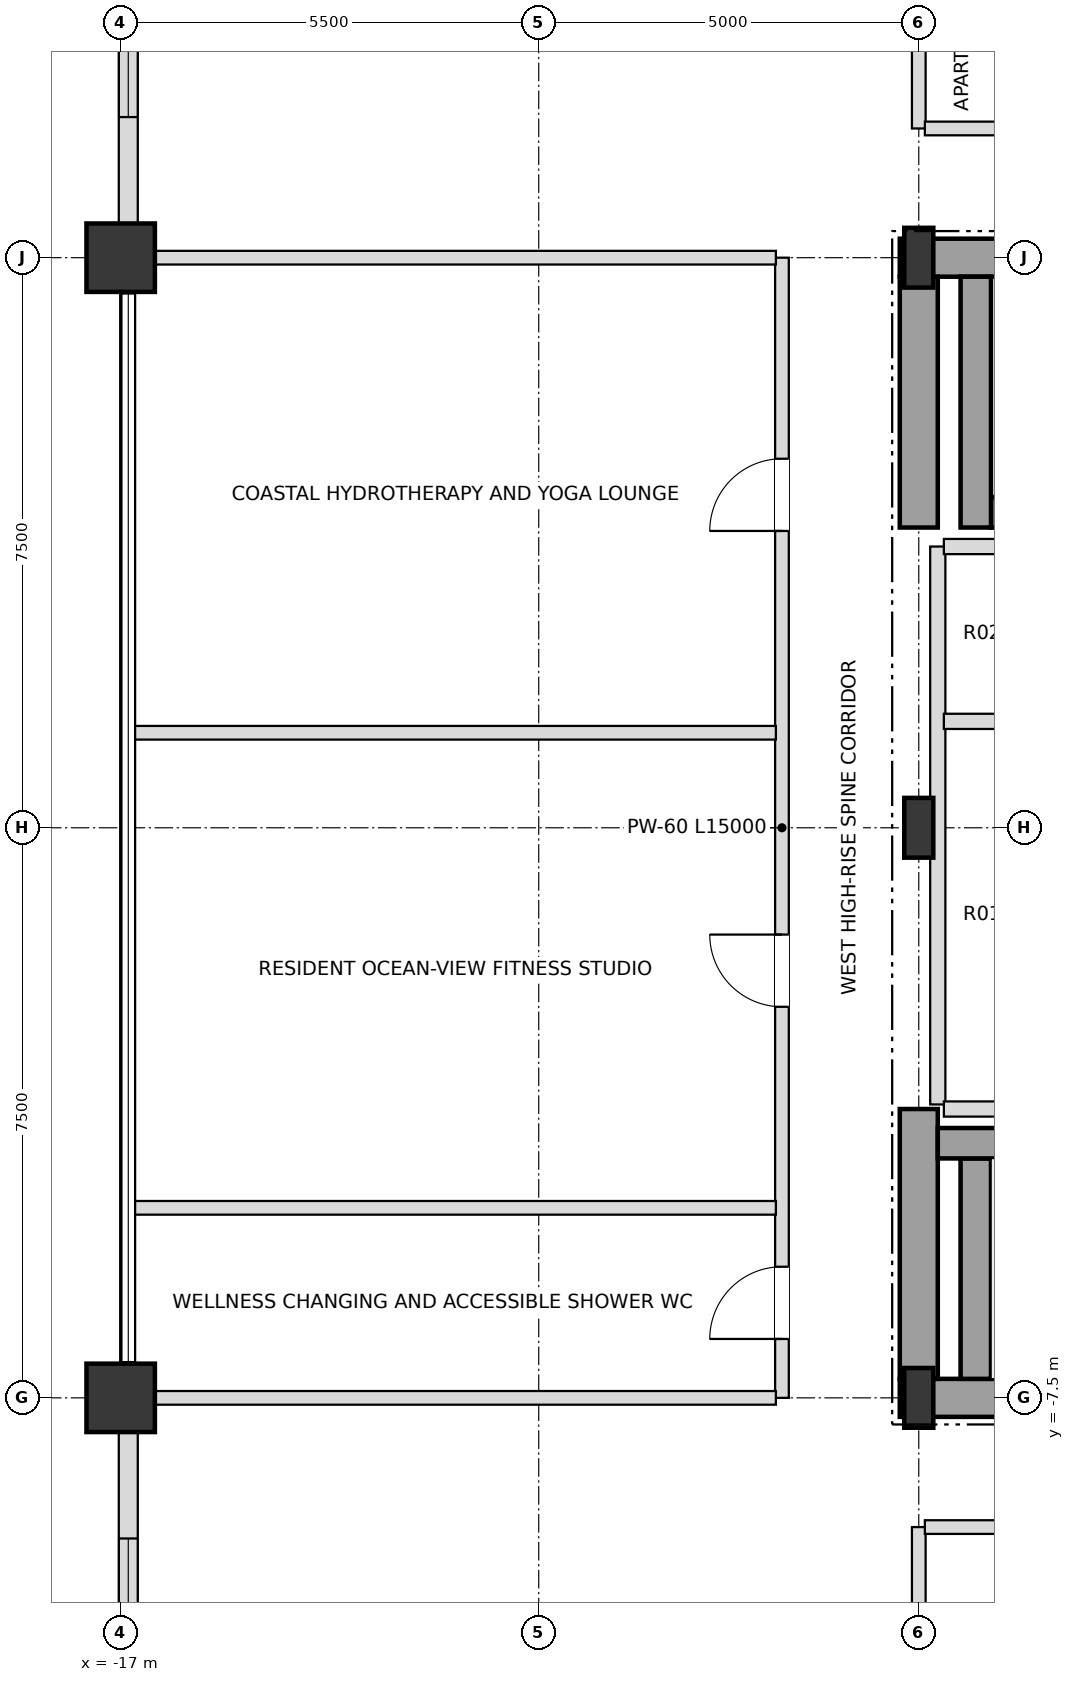
"""IFC4 building model, lengths in metres.
Left out: names, types, materials, properties, quantities, classifications, styles, units other than length and angle.
Written with IfcOpenShell. Run it as: python <this file> out.ifc"""

import sys

from ifc_helpers import new_model, si_unit, direction, frame, frame_2d, origin, origin_2d, place, context, subcontext, project, spatial, rectangle, i_section, extrude, element, fill, save


model = new_model("IFC4")
c1 = context("Model", 3, precision=1e-05, world=origin(), true_north=direction((0.0, 1.0)))
c2 = subcontext(c1, "Body", "Model", "MODEL_VIEW")
j1 = project(units=[si_unit("LENGTHUNIT", "METRE"), si_unit("PLANEANGLEUNIT", "RADIAN")], contexts=[c1])
p1 = place(None, origin())
s1 = spatial("IfcSite", under=j1, at=p1, CompositionType="ELEMENT")
p2 = place(p1, origin())
s2 = spatial("IfcBuilding", under=s1, at=p2, CompositionType="ELEMENT")
p3 = place(p2, frame((0.0, 0.0, 279.9)))
s3 = spatial("IfcBuildingStorey", under=s2, at=p3, CompositionType="ELEMENT", Elevation=279.9)
for number, where, z_axis, x_axis in (
    (1, (-6.5, -7.5, 0.0), (0.0, 0.0, 1.0), (1.0, 0.0, 0.0)),
    (2, (-6.5, 0.0, 0.0), (0.0, 0.0, 1.0), (1.0, 0.0, 0.0)),
    (3, (-6.5, 7.5, 0.0), (0.0, 0.0, 1.0), (1.0, 0.0, 0.0)),
):
    element("IfcColumn", number, at=place(p3, frame(where, z_axis=z_axis, x_axis=x_axis)), inside=s3, PredefinedType="COLUMN", context=c2, shape_type="SweptSolid", body=[
        extrude(i_section(OverallWidth=0.382, OverallDepth=0.786, WebThickness=0.02, FlangeThickness=0.033, at=origin_2d()), origin(), (0.0, 0.0, 1.0), 3.6),
    ])
for number, where, z_axis, x_axis in (
    (4, (-17.0, 7.5, 0.0), (0.0, 0.0, 1.0), (1.0, 0.0, 0.0)),
    (5, (-17.0, -7.5, 0.0), (0.0, 0.0, 1.0), (1.0, 0.0, 0.0)),
):
    element("IfcColumn", number, at=place(p3, frame(where, z_axis=z_axis, x_axis=x_axis)), inside=s3, PredefinedType="USERDEFINED", context=c2, shape_type="SweptSolid", body=[
        extrude(rectangle(XDim=0.9, YDim=0.9, at=origin_2d()), origin(), (0.0, 0.0, 1.0), 3.6),
    ])
p4 = place(p3, frame((-16.9, 12.555, 0.0), z_axis=(0.0, 0.0, 1.0), x_axis=(0.0, -1.0, 0.0)))
e6 = element("IfcWall", 6, at=p4, inside=s3, PredefinedType="SOLIDWALL", context=c2, shape_type="SweptSolid", body=[
    extrude(rectangle(XDim=4.61, YDim=0.25, at=frame_2d((2.305, 0.0))), origin(), (0.0, 0.0, 1.0), 2.748),
])
p5 = place(p4, frame((1.405, 0.0, 0.72)))
e7 = element("IfcOpeningElement", 7, at=p5, cuts=e6, PredefinedType="OPENING", context=c2, shape_type="SweptSolid", body=[
    extrude(rectangle(XDim=1.8, YDim=1.68, at=frame_2d((0.9, 0.84))), frame((0.0, 0.135, 0.0), z_axis=(0.0, -1.0, 0.0), x_axis=(1.0, 0.0, 0.0)), (0.0, 0.0, 1.0), 0.27),
])
p6 = place(p3, frame((-16.9, -7.945, 0.0), z_axis=(0.0, 0.0, 1.0), x_axis=(0.0, -1.0, 0.0)))
e8 = element("IfcWall", 8, at=p6, inside=s3, PredefinedType="SOLIDWALL", context=c2, shape_type="SweptSolid", body=[
    extrude(rectangle(XDim=4.61, YDim=0.25, at=frame_2d((2.305, 0.0))), origin(), (0.0, 0.0, 1.0), 2.748),
])
p7 = place(p6, frame((1.405, 0.0, 0.72)))
e9 = element("IfcOpeningElement", 9, at=p7, cuts=e8, PredefinedType="OPENING", context=c2, shape_type="SweptSolid", body=[
    extrude(rectangle(XDim=1.8, YDim=1.68, at=frame_2d((0.9, 0.84))), frame((0.0, 0.135, 0.0), z_axis=(0.0, -1.0, 0.0), x_axis=(1.0, 0.0, 0.0)), (0.0, 0.0, 1.0), 0.27),
])
p8 = place(p3, frame((-6.75, -7.5, 0.0), z_axis=(0.0, 0.0, 1.0), x_axis=(1.0, 0.0, 0.0)))
e10 = element("IfcWall", 10, at=p8, inside=s3, PredefinedType="SHEAR", context=c2, shape_type="SweptSolid", body=[
    extrude(rectangle(XDim=6.75, YDim=0.5, at=frame_2d((3.375, 0.0))), origin(), (0.0, 0.0, 1.0), 3.38),
])
p9 = place(p3, frame((-6.75, 7.5, 0.0), z_axis=(0.0, 0.0, 1.0), x_axis=(1.0, 0.0, 0.0)))
e11 = element("IfcWall", 11, at=p9, inside=s3, PredefinedType="SHEAR", context=c2, shape_type="SweptSolid", body=[
    extrude(rectangle(XDim=6.75, YDim=0.5, at=frame_2d((3.375, 0.0))), origin(), (0.0, 0.0, 1.0), 3.38),
])
p10 = place(p9, frame((1.65, 0.0, 0.0)))
e12 = element("IfcOpeningElement", 12, at=p10, cuts=e11, PredefinedType="OPENING", context=c2, shape_type="SweptSolid", body=[
    extrude(rectangle(XDim=1.05, YDim=2.15, at=frame_2d((0.525, 1.075))), frame((0.0, 0.26, 0.0), z_axis=(0.0, -1.0, 0.0), x_axis=(1.0, 0.0, 0.0)), (0.0, 0.0, 1.0), 0.52),
])
p11 = place(p3, frame((-6.5, -7.25, 0.0), z_axis=(0.0, 0.0, 1.0), x_axis=(0.0, 1.0, 0.0)))
e13 = element("IfcWall", 13, at=p11, inside=s3, PredefinedType="SHEAR", context=c2, shape_type="SweptSolid", body=[
    extrude(rectangle(XDim=3.55, YDim=0.5, at=frame_2d((1.775, 0.0))), origin(), (0.0, 0.0, 1.0), 3.38),
])
p12 = place(p3, frame((-6.5, 3.95, 0.0), z_axis=(0.0, 0.0, 1.0), x_axis=(0.0, 1.0, 0.0)))
e14 = element("IfcWall", 14, at=p12, inside=s3, PredefinedType="SHEAR", context=c2, shape_type="SweptSolid", body=[
    extrude(rectangle(XDim=3.3, YDim=0.5, at=frame_2d((1.65, 0.0))), origin(), (0.0, 0.0, 1.0), 3.38),
])
p13 = place(p3, frame((-5.75, -7.25, 0.0), z_axis=(0.0, 0.0, 1.0), x_axis=(0.0, 1.0, 0.0)))
e15 = element("IfcWall", 15, at=p13, inside=s3, PredefinedType="SHEAR", context=c2, shape_type="SweptSolid", body=[
    extrude(rectangle(XDim=2.9, YDim=0.4, at=frame_2d((1.45, 0.0))), origin(), (0.0, 0.0, 1.0), 3.38),
])
p14 = place(p3, frame((-6.25, -4.15, 0.0), z_axis=(0.0, 0.0, 1.0), x_axis=(1.0, 0.0, 0.0)))
e16 = element("IfcWall", 16, at=p14, inside=s3, PredefinedType="SHEAR", context=c2, shape_type="SweptSolid", body=[
    extrude(rectangle(XDim=7.78, YDim=0.4, at=frame_2d((3.89, 0.0))), origin(), (0.0, 0.0, 1.0), 3.38),
])
p15 = place(p3, frame((-5.55, 4.15, 0.0), z_axis=(0.0, 0.0, 1.0), x_axis=(1.0, 0.0, 0.0)))
e17 = element("IfcWall", 17, at=p15, inside=s3, PredefinedType="SHEAR", context=c2, shape_type="SweptSolid", body=[
    extrude(rectangle(XDim=7.08, YDim=0.4, at=frame_2d((3.54, 0.0))), origin(), (0.0, 0.0, 1.0), 3.38),
])
p16 = place(p3, frame((-5.75, 3.95, 0.0), z_axis=(0.0, 0.0, 1.0), x_axis=(0.0, 1.0, 0.0)))
e18 = element("IfcWall", 18, at=p16, inside=s3, PredefinedType="SHEAR", context=c2, shape_type="SweptSolid", body=[
    extrude(rectangle(XDim=3.3, YDim=0.4, at=frame_2d((1.65, 0.0))), origin(), (0.0, 0.0, 1.0), 3.38),
])
p17 = place(p3, frame((-8.3, -7.5, 0.0), z_axis=(0.0, 0.0, 1.0), x_axis=(0.0, 1.0, 0.0)))
e19 = element("IfcWall", 19, at=p17, inside=s3, PredefinedType="PARTITIONING", context=c2, shape_type="SweptSolid", body=[
    extrude(rectangle(XDim=15.0, YDim=0.18, at=frame_2d((7.5, 0.0))), origin(), (0.0, 0.0, 1.0), 3.38),
])
p18 = place(p17, frame((0.775, 0.0, 0.0)))
e20 = element("IfcOpeningElement", 20, at=p18, cuts=e19, PredefinedType="OPENING", context=c2, shape_type="SweptSolid", body=[
    extrude(rectangle(XDim=0.95, YDim=2.15, at=frame_2d((0.475, 1.075))), frame((0.0, 0.1, 0.0), z_axis=(0.0, -1.0, 0.0), x_axis=(1.0, 0.0, 0.0)), (0.0, 0.0, 1.0), 0.2),
])
p19 = place(p17, frame((5.145, 0.0, 0.0)))
e21 = element("IfcOpeningElement", 21, at=p19, cuts=e19, PredefinedType="OPENING", context=c2, shape_type="SweptSolid", body=[
    extrude(rectangle(XDim=0.95, YDim=2.15, at=frame_2d((0.475, 1.075))), frame((0.0, 0.1, 0.0), z_axis=(0.0, -1.0, 0.0), x_axis=(1.0, 0.0, 0.0)), (0.0, 0.0, 1.0), 0.2),
])
p20 = place(p17, frame((11.405, 0.0, 0.0)))
e22 = element("IfcOpeningElement", 22, at=p20, cuts=e19, PredefinedType="OPENING", context=c2, shape_type="SweptSolid", body=[
    extrude(rectangle(XDim=0.95, YDim=2.15, at=frame_2d((0.475, 1.075))), frame((0.0, 0.1, 0.0), z_axis=(0.0, -1.0, 0.0), x_axis=(1.0, 0.0, 0.0)), (0.0, 0.0, 1.0), 0.2),
])
for number, where, z_axis, x_axis in (
    (23, (-6.5, -19.9, 0.0), (0.0, 0.0, 1.0), (0.0, 1.0, 0.0)),
    (24, (-6.5, 9.2, 0.0), (0.0, 0.0, 1.0), (0.0, 1.0, 0.0)),
):
    element("IfcWall", number, at=place(p3, frame(where, z_axis=z_axis, x_axis=x_axis)), inside=s3, PredefinedType="PARTITIONING", context=c2, shape_type="SweptSolid", body=[
        extrude(rectangle(XDim=10.7, YDim=0.18, at=frame_2d((5.35, 0.0))), origin(), (0.0, 0.0, 1.0), 2.826),
    ])
p21 = place(p3, frame((-6.25, -3.64, 0.0), z_axis=(0.0, 0.0, 1.0), x_axis=(0.0, 1.0, 0.0)))
e25 = element("IfcWall", 25, at=p21, inside=s3, PredefinedType="SOLIDWALL", context=c2, shape_type="SweptSolid", body=[
    extrude(rectangle(XDim=7.34, YDim=0.2, at=frame_2d((3.67, 0.0))), origin(), (0.0, 0.0, 1.0), 3.38),
])
p22 = place(p3, frame((-6.42, -9.2, 0.0), z_axis=(0.0, 0.0, 1.0), x_axis=(1.0, 0.0, 0.0)))
e26 = element("IfcWall", 26, at=p22, inside=s3, PredefinedType="PARTITIONING", context=c2, shape_type="SweptSolid", body=[
    extrude(rectangle(XDim=5.94, YDim=0.18, at=frame_2d((2.97, 0.0))), origin(), (0.0, 0.0, 1.0), 3.38),
])
p23 = place(p22, frame((2.485, 0.0, 0.0)))
e27 = element("IfcOpeningElement", 27, at=p23, cuts=e26, PredefinedType="OPENING", context=c2, shape_type="SweptSolid", body=[
    extrude(rectangle(XDim=0.95, YDim=2.15, at=frame_2d((0.475, 1.075))), frame((0.0, 0.1, 0.0), z_axis=(0.0, -1.0, 0.0), x_axis=(1.0, 0.0, 0.0)), (0.0, 0.0, 1.0), 0.2),
])
p24 = place(p3, frame((-16.9, -7.5, 0.0), z_axis=(0.0, 0.0, 1.0), x_axis=(1.0, 0.0, 0.0)))
e28 = element("IfcWall", 28, at=p24, inside=s3, PredefinedType="PARTITIONING", context=c2, shape_type="SweptSolid", body=[
    extrude(rectangle(XDim=8.52, YDim=0.18, at=frame_2d((4.26, 0.0))), origin(), (0.0, 0.0, 1.0), 2.826),
])
p25 = place(p3, frame((-16.82, -5.0, 0.0), z_axis=(0.0, 0.0, 1.0), x_axis=(1.0, 0.0, 0.0)))
e29 = element("IfcWall", 29, at=p25, inside=s3, PredefinedType="PARTITIONING", context=c2, shape_type="SweptSolid", body=[
    extrude(rectangle(XDim=8.44, YDim=0.18, at=frame_2d((4.22, 0.0))), origin(), (0.0, 0.0, 1.0), 3.018),
])
p26 = place(p3, frame((-6.17, -3.7, 0.0), z_axis=(0.0, 0.0, 1.0), x_axis=(1.0, 0.0, 0.0)))
e30 = element("IfcWall", 30, at=p26, inside=s3, PredefinedType="SOLIDWALL", context=c2, shape_type="SweptSolid", body=[
    extrude(rectangle(XDim=1.94, YDim=0.2, at=frame_2d((0.97, 0.0))), origin(), (0.0, 0.0, 1.0), 3.38),
])
p27 = place(p3, frame((-16.82, 1.25, 0.0), z_axis=(0.0, 0.0, 1.0), x_axis=(1.0, 0.0, 0.0)))
e31 = element("IfcWall", 31, at=p27, inside=s3, PredefinedType="PARTITIONING", context=c2, shape_type="SweptSolid", body=[
    extrude(rectangle(XDim=8.44, YDim=0.18, at=frame_2d((4.22, 0.0))), origin(), (0.0, 0.0, 1.0), 3.018),
])
for number, where, z_axis, x_axis in (
    (32, (-6.17, 1.4, 0.0), (0.0, 0.0, 1.0), (1.0, 0.0, 0.0)),
    (33, (-6.17, 3.7, 0.0), (0.0, 0.0, 1.0), (1.0, 0.0, 0.0)),
):
    element("IfcWall", number, at=place(p3, frame(where, z_axis=z_axis, x_axis=x_axis)), inside=s3, PredefinedType="SOLIDWALL", context=c2, shape_type="SweptSolid", body=[
        extrude(rectangle(XDim=1.94, YDim=0.2, at=frame_2d((0.97, 0.0))), origin(), (0.0, 0.0, 1.0), 3.38),
    ])
p28 = place(p3, frame((-16.9, 7.5, 0.0), z_axis=(0.0, 0.0, 1.0), x_axis=(1.0, 0.0, 0.0)))
e34 = element("IfcWall", 34, at=p28, inside=s3, PredefinedType="PARTITIONING", context=c2, shape_type="SweptSolid", body=[
    extrude(rectangle(XDim=8.52, YDim=0.18, at=frame_2d((4.26, 0.0))), origin(), (0.0, 0.0, 1.0), 2.826),
])
p29 = place(p3, frame((-6.42, 9.2, 0.0), z_axis=(0.0, 0.0, 1.0), x_axis=(1.0, 0.0, 0.0)))
e35 = element("IfcWall", 35, at=p29, inside=s3, PredefinedType="PARTITIONING", context=c2, shape_type="SweptSolid", body=[
    extrude(rectangle(XDim=1.79, YDim=0.18, at=frame_2d((0.895, 0.0))), origin(), (0.0, 0.0, 1.0), 3.38),
])
p30 = place(p5, origin())
e36 = element("IfcWindow", 36, at=p30, inside=s3, PartitioningType="SINGLE_PANEL", PredefinedType="WINDOW", context=c2, shape_type="SweptSolid", body=[
    extrude(rectangle(XDim=1.8, YDim=1.68, at=frame_2d((0.9, 0.84))), frame((0.0, 0.03, 0.0), z_axis=(0.0, -1.0, 0.0), x_axis=(1.0, 0.0, 0.0)), (0.0, 0.0, 1.0), 0.06),
])
fill(e7, e36)
p31 = place(p7, origin())
e37 = element("IfcWindow", 37, at=p31, inside=s3, PartitioningType="SINGLE_PANEL", PredefinedType="WINDOW", context=c2, shape_type="SweptSolid", body=[
    extrude(rectangle(XDim=1.8, YDim=1.68, at=frame_2d((0.9, 0.84))), frame((0.0, 0.03, 0.0), z_axis=(0.0, -1.0, 0.0), x_axis=(1.0, 0.0, 0.0)), (0.0, 0.0, 1.0), 0.06),
])
fill(e9, e37)
p32 = place(p18, origin())
e38 = element("IfcDoor", 38, at=p32, inside=s3, OperationType="SINGLE_SWING_LEFT", PredefinedType="DOOR", context=c2, shape_type="SweptSolid", body=[
    extrude(rectangle(XDim=0.95, YDim=2.15, at=frame_2d((0.475, 1.075))), frame((0.0, 0.025, 0.0), z_axis=(0.0, -1.0, 0.0), x_axis=(1.0, 0.0, 0.0)), (0.0, 0.0, 1.0), 0.05),
])
fill(e20, e38)
p33 = place(p19, origin())
e39 = element("IfcDoor", 39, at=p33, inside=s3, OperationType="SINGLE_SWING_RIGHT", PredefinedType="DOOR", context=c2, shape_type="SweptSolid", body=[
    extrude(rectangle(XDim=0.95, YDim=2.15, at=frame_2d((0.475, 1.075))), frame((0.0, 0.025, 0.0), z_axis=(0.0, -1.0, 0.0), x_axis=(1.0, 0.0, 0.0)), (0.0, 0.0, 1.0), 0.05),
])
fill(e21, e39)
p34 = place(p20, origin())
e40 = element("IfcDoor", 40, at=p34, inside=s3, OperationType="SINGLE_SWING_LEFT", PredefinedType="DOOR", context=c2, shape_type="SweptSolid", body=[
    extrude(rectangle(XDim=0.95, YDim=2.15, at=frame_2d((0.475, 1.075))), frame((0.0, 0.025, 0.0), z_axis=(0.0, -1.0, 0.0), x_axis=(1.0, 0.0, 0.0)), (0.0, 0.0, 1.0), 0.05),
])
fill(e22, e40)
save(model, sys.argv[1])
